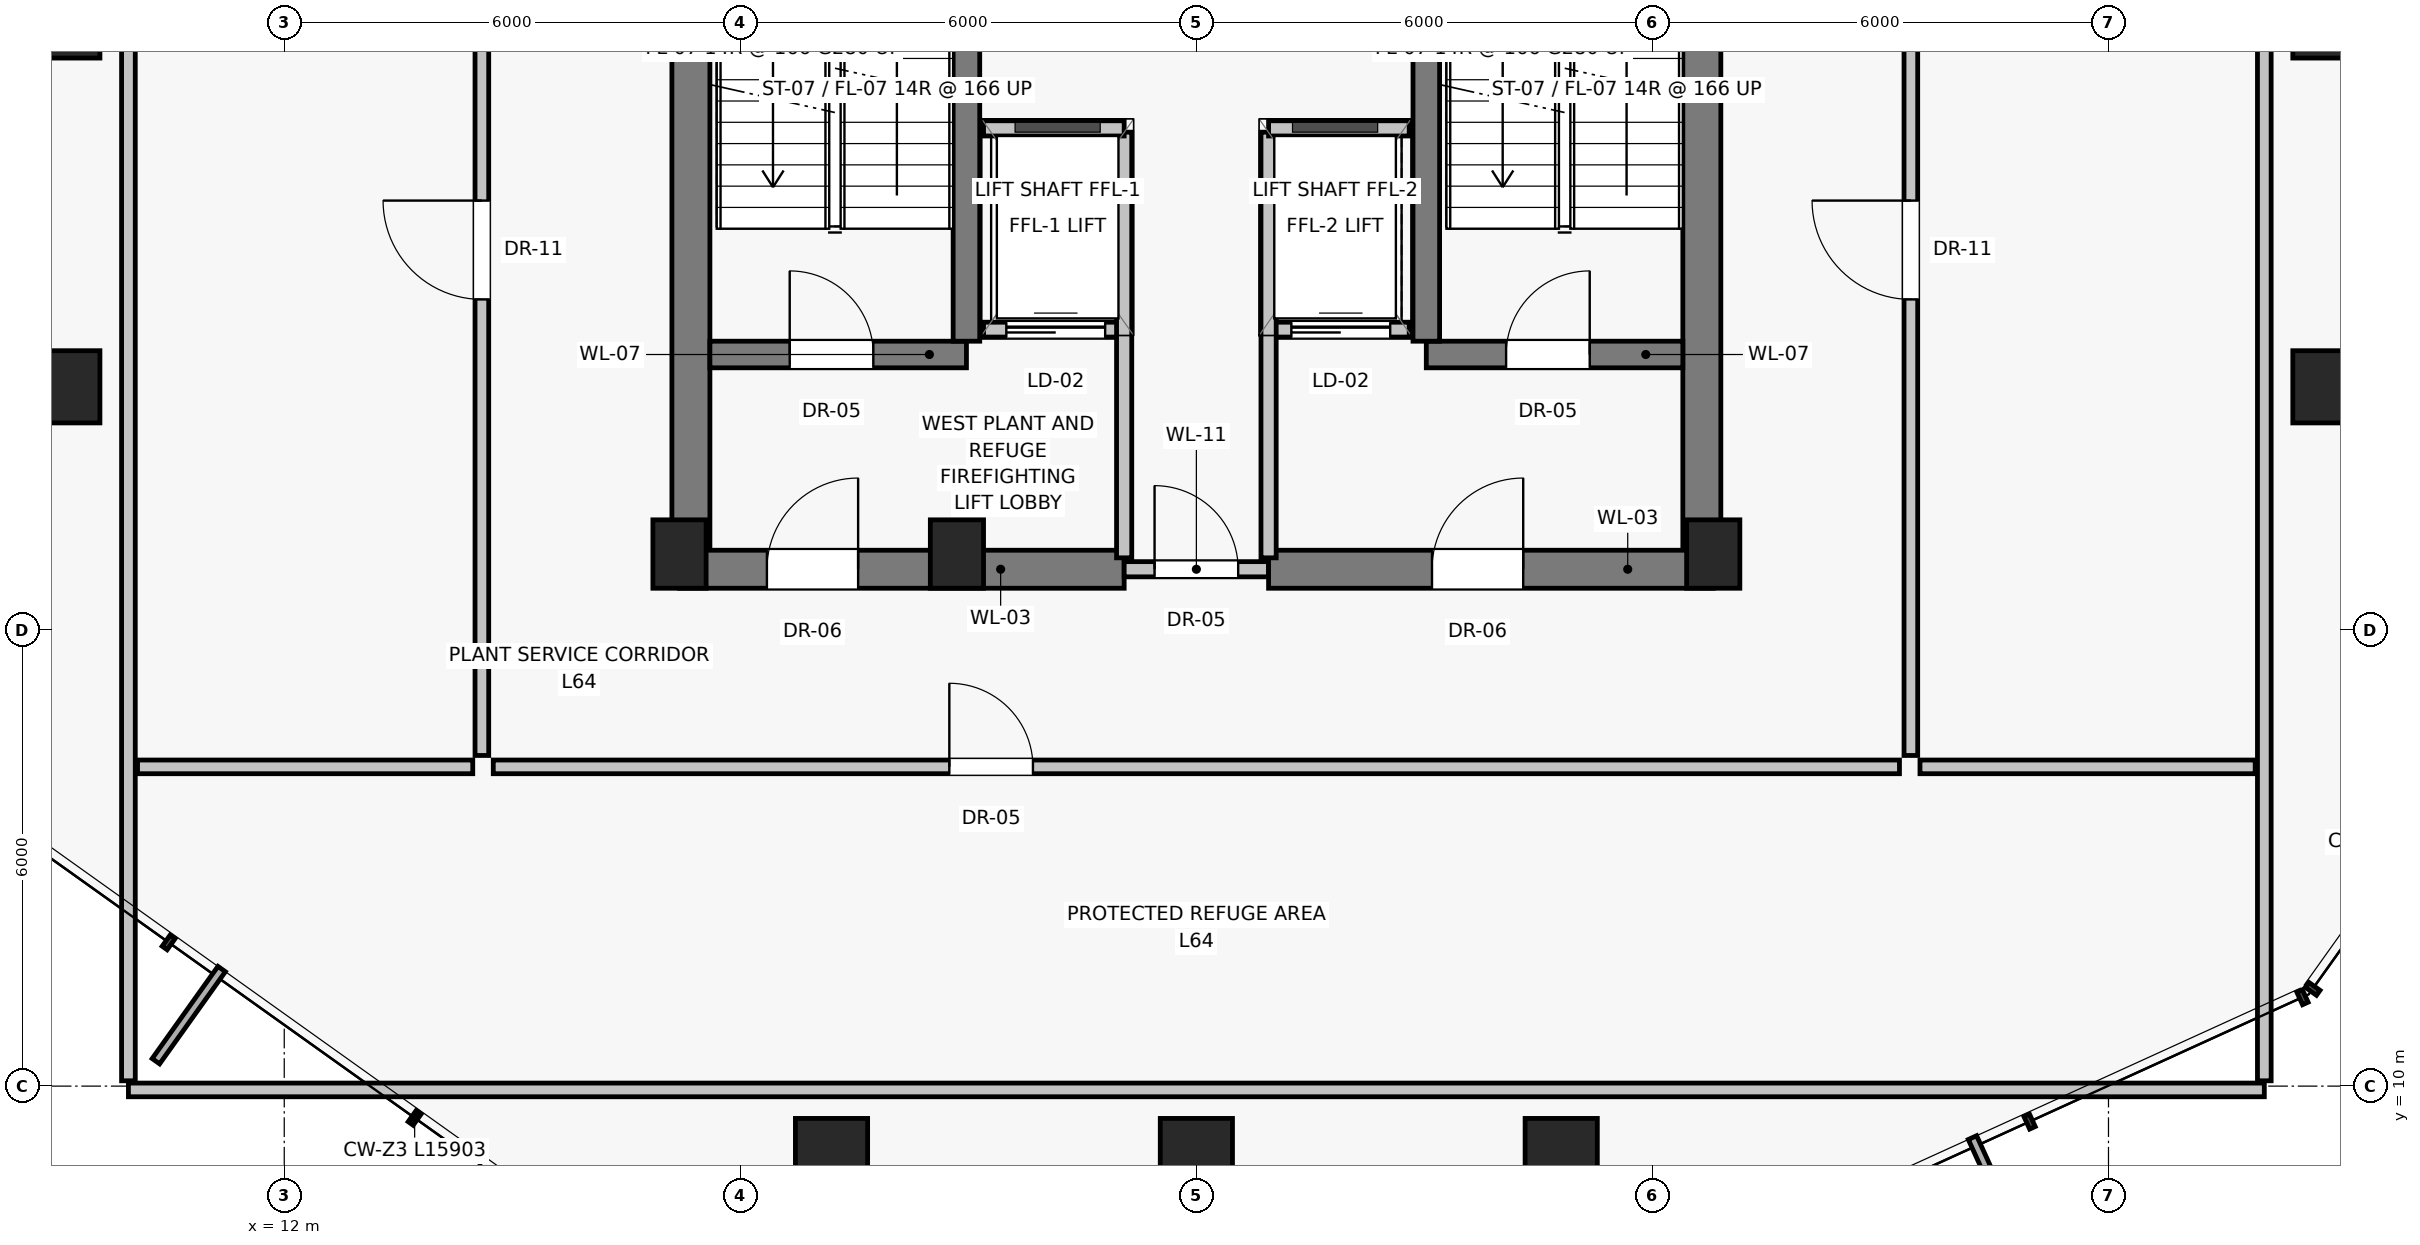
"""IFC4 building model, lengths in metres.
Left out: names, types, materials, properties, quantities, classifications, styles, units other than length and angle.
Written with IfcOpenShell. Run it as: python <this file> out.ifc"""

import sys

from ifc_helpers import new_model, si_unit, direction, frame, frame_2d, origin, origin_2d, place, context, subcontext, project, spatial, rectangle, extrude, source, transform, mapped, element, fill, save


model = new_model("IFC4")
c1 = context("Model", 3, precision=1e-05, world=origin(), true_north=direction((0.0, 1.0)))
c2 = subcontext(c1, "Body", "Model", "MODEL_VIEW")
j1 = project(units=[si_unit("LENGTHUNIT", "METRE"), si_unit("PLANEANGLEUNIT", "RADIAN")], contexts=[c1])
p1 = place(None, origin())
s1 = spatial("IfcSite", under=j1, at=p1, CompositionType="ELEMENT")
p2 = place(p1, origin())
s2 = spatial("IfcBuilding", under=s1, at=p2, CompositionType="ELEMENT")
p3 = place(p2, frame((0.0, 0.0, 225.4)))
s3 = spatial("IfcBuildingStorey", under=s2, at=p3, CompositionType="ELEMENT", Elevation=225.4)
for number, where, z_axis, x_axis in (
    (1, (17.2, 17.0, 0.0), (0.0, 0.0, 1.0), (1.0, 0.0, 0.0)),
    (2, (20.85, 17.0, 0.0), (0.0, 0.0, 1.0), (1.0, 0.0, 0.0)),
    (3, (30.8, 17.0, 0.0), (0.0, 0.0, 1.0), (1.0, 0.0, 0.0)),
):
    element("IfcColumn", number, at=place(p3, frame(where, z_axis=z_axis, x_axis=x_axis)), inside=s3, PredefinedType="PILASTER", context=c2, shape_type="SweptSolid", body=[
        extrude(rectangle(XDim=0.7, YDim=0.9, at=origin_2d()), origin(), (0.0, 0.0, 1.0), 4.65),
    ])
for number, where, z_axis, x_axis in (
    (4, (38.9, 19.2, 0.0), (0.0, 0.0, 1.0), (1.0, 0.0, 0.0)),
    (5, (38.9, 24.0, 0.0), (0.0, 0.0, 1.0), (1.0, 0.0, 0.0)),
    (6, (9.1, 24.0, 0.0), (0.0, 0.0, 1.0), (1.0, 0.0, 0.0)),
    (7, (9.1, 19.2, 0.0), (0.0, 0.0, 1.0), (1.0, 0.0, 0.0)),
    (8, (19.2, 9.1, 0.0), (0.0, 0.0, 1.0), (1.0, 0.0, 0.0)),
    (9, (24.0, 9.1, 0.0), (0.0, 0.0, 1.0), (1.0, 0.0, 0.0)),
    (10, (28.8, 9.1, 0.0), (0.0, 0.0, 1.0), (1.0, 0.0, 0.0)),
):
    element("IfcColumn", number, at=place(p3, frame(where, z_axis=z_axis, x_axis=x_axis)), inside=s3, PredefinedType="COLUMN", context=c2, shape_type="SweptSolid", body=[
        extrude(rectangle(XDim=0.95, YDim=0.95, at=origin_2d()), origin(), (0.0, 0.0, 1.0), 4.65),
    ])
for number, where, z_axis, x_axis in (
    (11, (17.35, 16.8, 0.0), (0.0, 0.0, 1.0), (0.0, 1.0, 0.0)),
    (12, (30.65, 16.8, 0.0), (0.0, 0.0, 1.0), (0.0, 1.0, 0.0)),
):
    element("IfcWall", number, at=place(p3, frame(where, z_axis=z_axis, x_axis=x_axis)), inside=s3, PredefinedType="SHEAR", context=c2, shape_type="SweptSolid", body=[
        extrude(rectangle(XDim=14.2, YDim=0.5, at=frame_2d((7.1, 0.0))), origin(), (0.0, 0.0, 1.0), 4.415),
    ])
p4 = place(p3, frame((17.2, 16.8, 0.0), z_axis=(0.0, 0.0, 1.0), x_axis=(1.0, 0.0, 0.0)))
e13 = element("IfcWall", 13, at=p4, inside=s3, PredefinedType="SHEAR", context=c2, shape_type="SweptSolid", body=[
    extrude(rectangle(XDim=5.85, YDim=0.5, at=frame_2d((2.925, 0.0))), origin(), (0.0, 0.0, 1.0), 4.415),
])
p5 = place(p4, frame((1.15, 0.0, 0.0)))
e14 = element("IfcOpeningElement", 14, at=p5, cuts=e13, PredefinedType="OPENING", context=c2, shape_type="SweptSolid", body=[
    extrude(rectangle(XDim=1.2, YDim=2.03, at=frame_2d((0.6, 1.015))), frame((0.0, 0.26, 0.0), z_axis=(0.0, -1.0, 0.0), x_axis=(1.0, 0.0, 0.0)), (0.0, 0.0, 1.0), 0.52),
])
p6 = place(p3, frame((23.05, 16.8, 0.0), z_axis=(0.0, 0.0, 1.0), x_axis=(1.0, 0.0, 0.0)))
e15 = element("IfcWall", 15, at=p6, inside=s3, PredefinedType="SOLIDWALL", context=c2, shape_type="SweptSolid", body=[
    extrude(rectangle(XDim=1.9, YDim=0.2, at=frame_2d((0.95, 0.0))), origin(), (0.0, 0.0, 1.0), 2.215),
])
p7 = place(p6, frame((0.4, 0.0, 0.0)))
e16 = element("IfcOpeningElement", 16, at=p7, cuts=e15, PredefinedType="OPENING", context=c2, shape_type="SweptSolid", body=[
    extrude(rectangle(XDim=1.1, YDim=2.03, at=frame_2d((0.55, 1.015))), frame((0.0, 0.11, 0.0), z_axis=(0.0, -1.0, 0.0), x_axis=(1.0, 0.0, 0.0)), (0.0, 0.0, 1.0), 0.22),
])
p8 = place(p3, frame((24.95, 16.8, 0.0), z_axis=(0.0, 0.0, 1.0), x_axis=(1.0, 0.0, 0.0)))
e17 = element("IfcWall", 17, at=p8, inside=s3, PredefinedType="SHEAR", context=c2, shape_type="SweptSolid", body=[
    extrude(rectangle(XDim=5.85, YDim=0.5, at=frame_2d((2.925, 0.0))), origin(), (0.0, 0.0, 1.0), 4.415),
])
p9 = place(p8, frame((2.15, 0.0, 0.0)))
e18 = element("IfcOpeningElement", 18, at=p9, cuts=e17, PredefinedType="OPENING", context=c2, shape_type="SweptSolid", body=[
    extrude(rectangle(XDim=1.2, YDim=2.03, at=frame_2d((0.6, 1.015))), frame((0.0, 0.26, 0.0), z_axis=(0.0, -1.0, 0.0), x_axis=(1.0, 0.0, 0.0)), (0.0, 0.0, 1.0), 0.52),
])
p10 = place(p3, frame((17.6, 19.625, 0.0), z_axis=(0.0, 0.0, 1.0), x_axis=(1.0, 0.0, 0.0)))
e19 = element("IfcWall", 19, at=p10, inside=s3, PredefinedType="SHEAR", context=c2, shape_type="SweptSolid", body=[
    extrude(rectangle(XDim=3.375, YDim=0.35, at=frame_2d((1.688, 0.0))), origin(), (0.0, 0.0, 1.0), 4.415),
])
p11 = place(p10, frame((1.05, 0.0, 0.0)))
e20 = element("IfcOpeningElement", 20, at=p11, cuts=e19, PredefinedType="OPENING", context=c2, shape_type="SweptSolid", body=[
    extrude(rectangle(XDim=1.1, YDim=2.03, at=frame_2d((0.55, 1.015))), frame((0.0, 0.185, 0.0), z_axis=(0.0, -1.0, 0.0), x_axis=(1.0, 0.0, 0.0)), (0.0, 0.0, 1.0), 0.37),
])
p12 = place(p3, frame((21.2, 19.95, 0.0), z_axis=(0.0, 0.0, 1.0), x_axis=(1.0, 0.0, 0.0)))
e21 = element("IfcWall", 21, at=p12, inside=s3, PredefinedType="SOLIDWALL", context=c2, shape_type="SweptSolid", body=[
    extrude(rectangle(XDim=1.85, YDim=0.2, at=frame_2d((0.925, 0.0))), origin(), (0.0, 0.0, 1.0), 4.415),
])
p13 = place(p12, frame((0.3, 0.0, 0.0)))
e22 = element("IfcOpeningElement", 22, at=p13, cuts=e21, PredefinedType="OPENING", context=c2, shape_type="SweptSolid", body=[
    extrude(rectangle(XDim=1.3, YDim=2.25, at=frame_2d((0.65, 1.125))), frame((0.0, 0.11, 0.0), z_axis=(0.0, -1.0, 0.0), x_axis=(1.0, 0.0, 0.0)), (0.0, 0.0, 1.0), 0.22),
])
p14 = place(p3, frame((24.95, 19.95, 0.0), z_axis=(0.0, 0.0, 1.0), x_axis=(1.0, 0.0, 0.0)))
e23 = element("IfcWall", 23, at=p14, inside=s3, PredefinedType="SOLIDWALL", context=c2, shape_type="SweptSolid", body=[
    extrude(rectangle(XDim=1.85, YDim=0.2, at=frame_2d((0.925, 0.0))), origin(), (0.0, 0.0, 1.0), 4.415),
])
p15 = place(p14, frame((0.3, 0.0, 0.0)))
e24 = element("IfcOpeningElement", 24, at=p15, cuts=e23, PredefinedType="OPENING", context=c2, shape_type="SweptSolid", body=[
    extrude(rectangle(XDim=1.3, YDim=2.25, at=frame_2d((0.65, 1.125))), frame((0.0, 0.11, 0.0), z_axis=(0.0, -1.0, 0.0), x_axis=(1.0, 0.0, 0.0)), (0.0, 0.0, 1.0), 0.22),
])
p16 = place(p3, frame((27.025, 19.625, 0.0), z_axis=(0.0, 0.0, 1.0), x_axis=(1.0, 0.0, 0.0)))
e25 = element("IfcWall", 25, at=p16, inside=s3, PredefinedType="SHEAR", context=c2, shape_type="SweptSolid", body=[
    extrude(rectangle(XDim=3.375, YDim=0.35, at=frame_2d((1.688, 0.0))), origin(), (0.0, 0.0, 1.0), 4.415),
])
p17 = place(p16, frame((1.05, 0.0, 0.0)))
e26 = element("IfcOpeningElement", 26, at=p17, cuts=e25, PredefinedType="OPENING", context=c2, shape_type="SweptSolid", body=[
    extrude(rectangle(XDim=1.1, YDim=2.03, at=frame_2d((0.55, 1.015))), frame((0.0, 0.185, 0.0), z_axis=(0.0, -1.0, 0.0), x_axis=(1.0, 0.0, 0.0)), (0.0, 0.0, 1.0), 0.37),
])
for number, where, z_axis, x_axis in (
    (27, (20.975, 19.8, 0.0), (0.0, 0.0, 1.0), (0.0, 1.0, 0.0)),
    (28, (27.025, 19.8, 0.0), (0.0, 0.0, 1.0), (0.0, 1.0, 0.0)),
):
    element("IfcWall", number, at=place(p3, frame(where, z_axis=z_axis, x_axis=x_axis)), inside=s3, PredefinedType="SHEAR", context=c2, shape_type="SweptSolid", body=[
        extrude(rectangle(XDim=8.775, YDim=0.35, at=frame_2d((4.387, 0.0))), origin(), (0.0, 0.0, 1.0), 4.415),
    ])
for number, where, z_axis, x_axis in (
    (29, (23.05, 16.95, 0.0), (0.0, 0.0, 1.0), (0.0, 1.0, 0.0)),
    (30, (24.95, 16.95, 0.0), (0.0, 0.0, 1.0), (0.0, 1.0, 0.0)),
):
    element("IfcWall", number, at=place(p3, frame(where, z_axis=z_axis, x_axis=x_axis)), inside=s3, PredefinedType="SOLIDWALL", context=c2, shape_type="SweptSolid", body=[
        extrude(rectangle(XDim=5.6, YDim=0.2, at=frame_2d((2.8, 0.0))), origin(), (0.0, 0.0, 1.0), 2.215),
    ])
for number, where, z_axis, x_axis in (
    (31, (21.2, 22.6, 0.0), (0.0, 0.0, 1.0), (1.0, 0.0, 0.0)),
    (32, (24.95, 22.6, 0.0), (0.0, 0.0, 1.0), (1.0, 0.0, 0.0)),
):
    element("IfcWall", number, at=place(p3, frame(where, z_axis=z_axis, x_axis=x_axis)), inside=s3, PredefinedType="SOLIDWALL", context=c2, shape_type="SweptSolid", body=[
        extrude(rectangle(XDim=1.85, YDim=0.2, at=frame_2d((0.925, 0.0))), origin(), (0.0, 0.0, 1.0), 4.415),
    ])
p18 = place(p3, frame((14.75, 14.2, 0.0), z_axis=(0.0, 0.0, 1.0), x_axis=(1.0, 0.0, 0.0)))
e33 = element("IfcWall", 33, at=p18, inside=s3, PredefinedType="PARTITIONING", context=c2, shape_type="SweptSolid", body=[
    extrude(rectangle(XDim=18.5, YDim=0.18, at=frame_2d((9.25, 0.0))), origin(), (0.0, 0.0, 1.0), 4.415),
])
p19 = place(p18, frame((6.0, 0.0, 0.0)))
e34 = element("IfcOpeningElement", 34, at=p19, cuts=e33, PredefinedType="OPENING", context=c2, shape_type="SweptSolid", body=[
    extrude(rectangle(XDim=1.1, YDim=2.03, at=frame_2d((0.55, 1.015))), frame((0.0, 0.1, 0.0), z_axis=(0.0, -1.0, 0.0), x_axis=(1.0, 0.0, 0.0)), (0.0, 0.0, 1.0), 0.2),
])
p20 = place(p3, frame((33.4, 14.35, 0.0), z_axis=(0.0, 0.0, 1.0), x_axis=(0.0, 1.0, 0.0)))
e35 = element("IfcWall", 35, at=p20, inside=s3, PredefinedType="PARTITIONING", context=c2, shape_type="SweptSolid", body=[
    extrude(rectangle(XDim=19.1, YDim=0.18, at=frame_2d((9.55, 0.0))), origin(), (0.0, 0.0, 1.0), 4.415),
])
p21 = place(p20, frame((6.0, 0.0, 0.0)))
e36 = element("IfcOpeningElement", 36, at=p21, cuts=e35, PredefinedType="OPENING", context=c2, shape_type="SweptSolid", body=[
    extrude(rectangle(XDim=1.3, YDim=2.3, at=frame_2d((0.65, 1.15))), frame((0.0, 0.1, 0.0), z_axis=(0.0, -1.0, 0.0), x_axis=(1.0, 0.0, 0.0)), (0.0, 0.0, 1.0), 0.2),
])
p22 = place(p3, frame((14.6, 14.35, 0.0), z_axis=(0.0, 0.0, 1.0), x_axis=(0.0, 1.0, 0.0)))
e37 = element("IfcWall", 37, at=p22, inside=s3, PredefinedType="PARTITIONING", context=c2, shape_type="SweptSolid", body=[
    extrude(rectangle(XDim=19.1, YDim=0.18, at=frame_2d((9.55, 0.0))), origin(), (0.0, 0.0, 1.0), 4.415),
])
p23 = place(p22, frame((6.0, 0.0, 0.0)))
e38 = element("IfcOpeningElement", 38, at=p23, cuts=e37, PredefinedType="OPENING", context=c2, shape_type="SweptSolid", body=[
    extrude(rectangle(XDim=1.3, YDim=2.3, at=frame_2d((0.65, 1.15))), frame((0.0, 0.1, 0.0), z_axis=(0.0, -1.0, 0.0), x_axis=(1.0, 0.0, 0.0)), (0.0, 0.0, 1.0), 0.2),
])
p24 = place(p3, frame((9.95, 9.95, 0.0), z_axis=(0.0, 0.0, 1.0), x_axis=(1.0, 0.0, 0.0)))
e39 = element("IfcWall", 39, at=p24, inside=s3, PredefinedType="PARTITIONING", context=c2, shape_type="SweptSolid", body=[
    extrude(rectangle(XDim=28.1, YDim=0.18, at=frame_2d((14.05, 0.0))), origin(), (0.0, 0.0, 1.0), 4.415),
])
for number, where, z_axis, x_axis in (
    (40, (9.95, 10.07, 0.0), (0.0, 0.0, 1.0), (0.0, 1.0, 0.0)),
    (41, (38.05, 10.07, 0.0), (0.0, 0.0, 1.0), (0.0, 1.0, 0.0)),
):
    element("IfcWall", number, at=place(p3, frame(where, z_axis=z_axis, x_axis=x_axis)), inside=s3, PredefinedType="PARTITIONING", context=c2, shape_type="SweptSolid", body=[
        extrude(rectangle(XDim=27.86, YDim=0.18, at=frame_2d((13.93, 0.0))), origin(), (0.0, 0.0, 1.0), 2.215),
    ])
for number, where, z_axis, x_axis in (
    (42, (10.07, 14.2, 0.0), (0.0, 0.0, 1.0), (1.0, 0.0, 0.0)),
    (43, (33.52, 14.2, 0.0), (0.0, 0.0, 1.0), (1.0, 0.0, 0.0)),
):
    element("IfcWall", number, at=place(p3, frame(where, z_axis=z_axis, x_axis=x_axis)), inside=s3, PredefinedType="PARTITIONING", context=c2, shape_type="SweptSolid", body=[
        extrude(rectangle(XDim=4.41, YDim=0.18, at=frame_2d((2.205, 0.0))), origin(), (0.0, 0.0, 1.0), 4.415),
    ])
m1 = source(origin(), c2, "Body", "SweptSolid", [
    extrude(rectangle(XDim=1.2, YDim=2.03, at=frame_2d((0.6, 1.015))), frame((0.0, 0.025, 0.0), z_axis=(0.0, -1.0, 0.0), x_axis=(1.0, 0.0, 0.0)), (0.0, 0.0, 1.0), 0.05),
])
p25 = place(p5, origin())
e44 = element("IfcDoor", 44, at=p25, inside=s3, OperationType="SINGLE_SWING_RIGHT", PredefinedType="DOOR", context=c2, shape_type="MappedRepresentation", body=[
    mapped(m1, transform((0.0, 0.0, 0.0), scale=1.0)),
])
fill(e14, e44)
m2 = source(origin(), c2, "Body", "SweptSolid", [
    extrude(rectangle(XDim=1.1, YDim=2.03, at=frame_2d((0.55, 1.015))), frame((0.0, 0.025, 0.0), z_axis=(0.0, -1.0, 0.0), x_axis=(1.0, 0.0, 0.0)), (0.0, 0.0, 1.0), 0.05),
])
p26 = place(p7, origin())
e45 = element("IfcDoor", 45, at=p26, inside=s3, OperationType="SINGLE_SWING_LEFT", PredefinedType="DOOR", context=c2, shape_type="MappedRepresentation", body=[
    mapped(m2, transform((0.0, 0.0, 0.0), scale=1.0)),
])
fill(e16, e45)
p27 = place(p9, origin())
e46 = element("IfcDoor", 46, at=p27, inside=s3, OperationType="SINGLE_SWING_RIGHT", PredefinedType="DOOR", context=c2, shape_type="MappedRepresentation", body=[
    mapped(m1, transform((0.0, 0.0, 0.0), scale=1.0)),
])
fill(e18, e46)
p28 = place(p11, origin())
e47 = element("IfcDoor", 47, at=p28, inside=s3, OperationType="SINGLE_SWING_LEFT", PredefinedType="DOOR", context=c2, shape_type="MappedRepresentation", body=[
    mapped(m2, transform((0.0, 0.0, 0.0), scale=1.0)),
])
fill(e20, e47)
m3 = source(origin(), c2, "Body", "SweptSolid", [
    extrude(rectangle(XDim=1.3, YDim=2.25, at=frame_2d((0.65, 1.125))), frame((0.0, 0.025, 0.0), z_axis=(0.0, -1.0, 0.0), x_axis=(1.0, 0.0, 0.0)), (0.0, 0.0, 1.0), 0.05),
])
p29 = place(p13, origin())
e48 = element("IfcDoor", 48, at=p29, inside=s3, OperationType="SLIDING_TO_LEFT", PredefinedType="DOOR", context=c2, shape_type="MappedRepresentation", body=[
    mapped(m3, transform((0.0, 0.0, 0.0), scale=1.0)),
])
fill(e22, e48)
p30 = place(p15, origin())
e49 = element("IfcDoor", 49, at=p30, inside=s3, OperationType="SLIDING_TO_LEFT", PredefinedType="DOOR", context=c2, shape_type="MappedRepresentation", body=[
    mapped(m3, transform((0.0, 0.0, 0.0), scale=1.0)),
])
fill(e24, e49)
p31 = place(p17, origin())
e50 = element("IfcDoor", 50, at=p31, inside=s3, OperationType="SINGLE_SWING_RIGHT", PredefinedType="DOOR", context=c2, shape_type="MappedRepresentation", body=[
    mapped(m2, transform((0.0, 0.0, 0.0), scale=1.0)),
])
fill(e26, e50)
p32 = place(p19, origin())
e51 = element("IfcDoor", 51, at=p32, inside=s3, OperationType="SINGLE_SWING_LEFT", PredefinedType="DOOR", context=c2, shape_type="MappedRepresentation", body=[
    mapped(m2, transform((0.0, 0.0, 0.0), scale=1.0)),
])
fill(e34, e51)
m4 = source(origin(), c2, "Body", "SweptSolid", [
    extrude(rectangle(XDim=1.3, YDim=2.3, at=frame_2d((0.65, 1.15))), frame((0.0, 0.025, 0.0), z_axis=(0.0, -1.0, 0.0), x_axis=(1.0, 0.0, 0.0)), (0.0, 0.0, 1.0), 0.05),
])
p33 = place(p21, origin())
e52 = element("IfcDoor", 52, at=p33, inside=s3, OperationType="SINGLE_SWING_RIGHT", PredefinedType="DOOR", context=c2, shape_type="MappedRepresentation", body=[
    mapped(m4, transform((0.0, 0.0, 0.0), scale=1.0)),
])
fill(e36, e52)
p34 = place(p23, origin())
e53 = element("IfcDoor", 53, at=p34, inside=s3, OperationType="SINGLE_SWING_RIGHT", PredefinedType="DOOR", context=c2, shape_type="MappedRepresentation", body=[
    mapped(m4, transform((0.0, 0.0, 0.0), scale=1.0)),
])
fill(e38, e53)
save(model, sys.argv[1])
